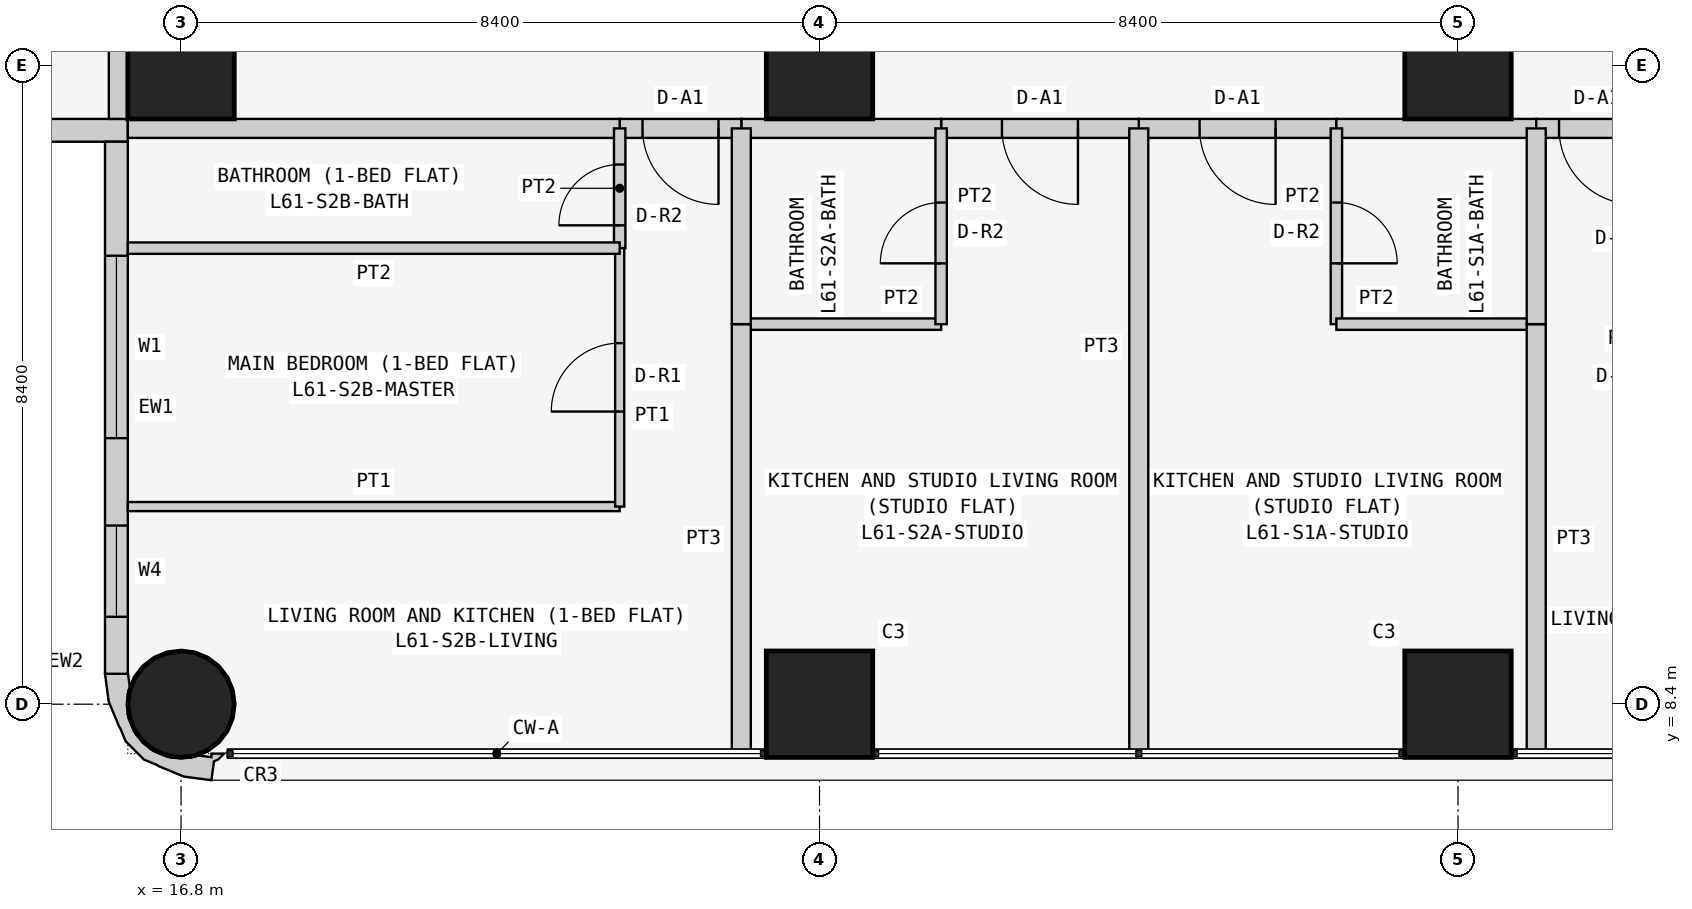
"""IFC4 building model, lengths in metres.
Left out: names, types, materials, properties, quantities, classifications, styles, units other than length and angle.
Written with IfcOpenShell. Run it as: python <this file> out.ifc"""

import sys

from ifc_helpers import new_model, si_unit, direction, frame, frame_2d, origin, origin_2d, place, context, subcontext, project, spatial, polyline, rectangle, circle, outline, extrude, element, fill, save


model = new_model("IFC4")
c1 = context("Model", 3, precision=1e-05, world=origin(), true_north=direction((0.0, 1.0)))
c2 = subcontext(c1, "Body", "Model", "MODEL_VIEW")
j1 = project(units=[si_unit("LENGTHUNIT", "METRE"), si_unit("PLANEANGLEUNIT", "RADIAN")], contexts=[c1])
p1 = place(None, origin())
s1 = spatial("IfcSite", under=j1, at=p1, CompositionType="ELEMENT")
p2 = place(p1, origin())
s2 = spatial("IfcBuilding", under=s1, at=p2, CompositionType="ELEMENT")
p3 = place(p2, frame((0.0, 0.0, 233.7)))
s3 = spatial("IfcBuildingStorey", under=s2, at=p3, CompositionType="ELEMENT", Elevation=233.7)
p4 = place(p3, frame((16.8, 8.4, 0.0), z_axis=(0.0, 0.0, 1.0), x_axis=(1.0, 0.0, 0.0)))
e1 = element("IfcColumn", 1, at=p4, inside=s3, PredefinedType="COLUMN", context=c2, shape_type="SweptSolid", body=[
    extrude(circle(Radius=0.7, at=origin_2d()), origin(), (0.0, 0.0, 1.0), 3.6),
])
for number, where, z_axis, x_axis in (
    (2, (16.8, 16.8, 0.0), (0.0, 0.0, 1.0), (1.0, 0.0, 0.0)),
    (3, (25.2, 8.4, 0.0), (0.0, 0.0, 1.0), (1.0, 0.0, 0.0)),
    (4, (25.2, 16.8, 0.0), (0.0, 0.0, 1.0), (1.0, 0.0, 0.0)),
    (5, (33.6, 8.4, 0.0), (0.0, 0.0, 1.0), (1.0, 0.0, 0.0)),
    (6, (33.6, 16.8, 0.0), (0.0, 0.0, 1.0), (1.0, 0.0, 0.0)),
):
    element("IfcColumn", number, at=place(p3, frame(where, z_axis=z_axis, x_axis=x_axis)), inside=s3, PredefinedType="COLUMN", context=c2, shape_type="SweptSolid", body=[
        extrude(rectangle(XDim=1.4, YDim=1.4, at=origin_2d()), origin(), (0.0, 0.0, 1.0), 3.6),
    ])
p5 = place(p3, frame((0.4, 15.95, 0.0), z_axis=(0.0, 0.0, 1.0), x_axis=(1.0, 0.0, 0.0)))
e7 = element("IfcWall", 7, at=p5, inside=s3, PredefinedType="SOLIDWALL", context=c2, shape_type="SweptSolid", body=[
    extrude(rectangle(XDim=15.7, YDim=0.3, at=frame_2d((7.85, 0.0))), origin(), (0.0, 0.0, 1.0), 3.45),
])
p6 = place(p5, frame((12.4, 0.0, 0.9)))
e8 = element("IfcOpeningElement", 8, at=p6, cuts=e7, PredefinedType="OPENING", context=c2, shape_type="SweptSolid", body=[
    extrude(rectangle(XDim=1.8, YDim=1.5, at=frame_2d((0.9, 0.75))), frame((0.0, 0.16, 0.0), z_axis=(0.0, -1.0, 0.0), x_axis=(1.0, 0.0, 0.0)), (0.0, 0.0, 1.0), 0.32),
])
p7 = place(p5, frame((9.55, 0.0, 1.5)))
e9 = element("IfcOpeningElement", 9, at=p7, cuts=e7, PredefinedType="OPENING", context=c2, shape_type="SweptSolid", body=[
    extrude(rectangle(XDim=0.9, YDim=0.7, at=frame_2d((0.45, 0.35))), frame((0.0, 0.16, 0.0), z_axis=(0.0, -1.0, 0.0), x_axis=(1.0, 0.0, 0.0)), (0.0, 0.0, 1.0), 0.32),
])
p8 = place(p5, frame((5.1, 0.0, 0.9)))
e10 = element("IfcOpeningElement", 10, at=p8, cuts=e7, PredefinedType="OPENING", context=c2, shape_type="SweptSolid", body=[
    extrude(rectangle(XDim=1.8, YDim=1.5, at=frame_2d((0.9, 0.75))), frame((0.0, 0.16, 0.0), z_axis=(0.0, -1.0, 0.0), x_axis=(1.0, 0.0, 0.0)), (0.0, 0.0, 1.0), 0.32),
])
p9 = place(p5, frame((2.0, 0.0, 0.0)))
e11 = element("IfcOpeningElement", 11, at=p9, cuts=e7, PredefinedType="OPENING", context=c2, shape_type="SweptSolid", body=[
    extrude(rectangle(XDim=0.9, YDim=2.4, at=frame_2d((0.45, 1.2))), frame((0.0, 0.16, 0.0), z_axis=(0.0, -1.0, 0.0), x_axis=(1.0, 0.0, 0.0)), (0.0, 0.0, 1.0), 0.32),
])
p10 = place(p5, frame((0.7, 0.0, 0.9)))
e12 = element("IfcOpeningElement", 12, at=p10, cuts=e7, PredefinedType="OPENING", context=c2, shape_type="SweptSolid", body=[
    extrude(rectangle(XDim=1.2, YDim=1.5, at=frame_2d((0.6, 0.75))), frame((0.0, 0.16, 0.0), z_axis=(0.0, -1.0, 0.0), x_axis=(1.0, 0.0, 0.0)), (0.0, 0.0, 1.0), 0.32),
])
p11 = place(p3, frame((15.95, 15.8, 0.0), z_axis=(0.0, 0.0, 1.0), x_axis=(0.0, -1.0, 0.0)))
e13 = element("IfcWall", 13, at=p11, inside=s3, PredefinedType="SOLIDWALL", context=c2, shape_type="SweptSolid", body=[
    extrude(rectangle(XDim=7.0, YDim=0.3, at=frame_2d((3.5, 0.0))), origin(), (0.0, 0.0, 1.0), 3.45),
])
p12 = place(p11, frame((1.5, 0.0, 0.9)))
e14 = element("IfcOpeningElement", 14, at=p12, cuts=e13, PredefinedType="OPENING", context=c2, shape_type="SweptSolid", body=[
    extrude(rectangle(XDim=2.4, YDim=1.5, at=frame_2d((1.2, 0.75))), frame((0.0, 0.16, 0.0), z_axis=(0.0, -1.0, 0.0), x_axis=(1.0, 0.0, 0.0)), (0.0, 0.0, 1.0), 0.32),
])
p13 = place(p11, frame((5.05, 0.0, 0.9)))
e15 = element("IfcOpeningElement", 15, at=p13, cuts=e13, PredefinedType="OPENING", context=c2, shape_type="SweptSolid", body=[
    extrude(rectangle(XDim=1.2, YDim=1.5, at=frame_2d((0.6, 0.75))), frame((0.0, 0.16, 0.0), z_axis=(0.0, -1.0, 0.0), x_axis=(1.0, 0.0, 0.0)), (0.0, 0.0, 1.0), 0.32),
])
p14 = place(p3, frame((16.076, 8.69, 0.0), z_axis=(0.0, 0.0, 1.0), x_axis=(-0.439933741929, -0.898030234854, 0.0)))
e16 = element("IfcWall", 16, at=p14, inside=s3, PredefinedType="SOLIDWALL", context=c2, shape_type="SweptSolid", body=[
    extrude(outline(polyline([(0.664, 1.577), (0.426, 1.497), (0.382, 1.536), (0.276, 1.572), (0.349, 1.423), (0.392, 1.444), (0.453, 1.261), (0.51, 1.211), (0.632, 0.961), (0.65, 0.683), (0.56, 0.419), (0.375, 0.21), (0.125, 0.087), (0.05, 0.082), (-0.127, -0.035), (-0.145, -0.044), (0.022, -0.296), (0.327, -0.094), (0.568, 0.18), (0.578, 0.199), (0.7, 0.337), (0.811, 0.661), (0.799, 0.846), (0.803, 0.866), (0.78, 1.231), (0.664, 1.577)])), origin(), (0.0, 0.0, 1.0), 3.45),
])
p15 = place(p3, frame((32.0, 15.975, 0.0), z_axis=(0.0, 0.0, 1.0), x_axis=(-1.0, 0.0, 0.0)))
e17 = element("IfcWall", 17, at=p15, inside=s3, PredefinedType="PARTITIONING", context=c2, shape_type="SweptSolid", body=[
    extrude(rectangle(XDim=2.6, YDim=0.25, at=frame_2d((1.3, 0.0))), origin(), (0.0, 0.0, 1.0), 3.45),
])
p16 = place(p15, frame((0.8, 0.0, 0.0)))
e18 = element("IfcOpeningElement", 18, at=p16, cuts=e17, PredefinedType="OPENING", context=c2, shape_type="SweptSolid", body=[
    extrude(rectangle(XDim=1.0, YDim=2.1, at=frame_2d((0.5, 1.05))), frame((0.0, 0.135, 0.0), z_axis=(0.0, -1.0, 0.0), x_axis=(1.0, 0.0, 0.0)), (0.0, 0.0, 1.0), 0.27),
])
p17 = place(p3, frame((34.629, 15.975, 0.0), z_axis=(0.0, 0.0, 1.0), x_axis=(-1.0, 0.0, 0.0)))
e19 = element("IfcWall", 19, at=p17, inside=s3, PredefinedType="PARTITIONING", context=c2, shape_type="SweptSolid", body=[
    extrude(rectangle(XDim=2.629, YDim=0.25, at=frame_2d((1.314, 0.0))), origin(), (0.0, 0.0, 1.0), 3.45),
])
p18 = place(p3, frame((36.229, 15.975, 0.0), z_axis=(0.0, 0.0, 1.0), x_axis=(-1.0, 0.0, 0.0)))
e20 = element("IfcWall", 20, at=p18, inside=s3, PredefinedType="PARTITIONING", context=c2, shape_type="SweptSolid", body=[
    extrude(rectangle(XDim=1.6, YDim=0.25, at=frame_2d((0.8, 0.0))), origin(), (0.0, 0.0, 1.0), 3.45),
])
p19 = place(p18, frame((0.3, 0.0, 0.0)))
e21 = element("IfcOpeningElement", 21, at=p19, cuts=e20, PredefinedType="OPENING", context=c2, shape_type="SweptSolid", body=[
    extrude(rectangle(XDim=1.0, YDim=2.1, at=frame_2d((0.5, 1.05))), frame((0.0, 0.135, 0.0), z_axis=(0.0, -1.0, 0.0), x_axis=(1.0, 0.0, 0.0)), (0.0, 0.0, 1.0), 0.27),
])
p20 = place(p3, frame((29.4, 15.975, 0.0), z_axis=(0.0, 0.0, 1.0), x_axis=(-1.0, 0.0, 0.0)))
e22 = element("IfcWall", 22, at=p20, inside=s3, PredefinedType="PARTITIONING", context=c2, shape_type="SweptSolid", body=[
    extrude(rectangle(XDim=2.6, YDim=0.25, at=frame_2d((1.3, 0.0))), origin(), (0.0, 0.0, 1.0), 3.45),
])
p21 = place(p20, frame((0.8, 0.0, 0.0)))
e23 = element("IfcOpeningElement", 23, at=p21, cuts=e22, PredefinedType="OPENING", context=c2, shape_type="SweptSolid", body=[
    extrude(rectangle(XDim=1.0, YDim=2.1, at=frame_2d((0.5, 1.05))), frame((0.0, 0.135, 0.0), z_axis=(0.0, -1.0, 0.0), x_axis=(1.0, 0.0, 0.0)), (0.0, 0.0, 1.0), 0.27),
])
p22 = place(p3, frame((26.8, 15.975, 0.0), z_axis=(0.0, 0.0, 1.0), x_axis=(-1.0, 0.0, 0.0)))
e24 = element("IfcWall", 24, at=p22, inside=s3, PredefinedType="PARTITIONING", context=c2, shape_type="SweptSolid", body=[
    extrude(rectangle(XDim=2.629, YDim=0.25, at=frame_2d((1.314, 0.0))), origin(), (0.0, 0.0, 1.0), 3.45),
])
p23 = place(p3, frame((24.171, 15.975, 0.0), z_axis=(0.0, 0.0, 1.0), x_axis=(-1.0, 0.0, 0.0)))
e25 = element("IfcWall", 25, at=p23, inside=s3, PredefinedType="PARTITIONING", context=c2, shape_type="SweptSolid", body=[
    extrude(rectangle(XDim=1.6, YDim=0.25, at=frame_2d((0.8, 0.0))), origin(), (0.0, 0.0, 1.0), 3.45),
])
p24 = place(p23, frame((0.3, 0.0, 0.0)))
e26 = element("IfcOpeningElement", 26, at=p24, cuts=e25, PredefinedType="OPENING", context=c2, shape_type="SweptSolid", body=[
    extrude(rectangle(XDim=1.0, YDim=2.1, at=frame_2d((0.5, 1.05))), frame((0.0, 0.135, 0.0), z_axis=(0.0, -1.0, 0.0), x_axis=(1.0, 0.0, 0.0)), (0.0, 0.0, 1.0), 0.27),
])
p25 = place(p3, frame((22.571, 15.975, 0.0), z_axis=(0.0, 0.0, 1.0), x_axis=(-1.0, 0.0, 0.0)))
e27 = element("IfcWall", 27, at=p25, inside=s3, PredefinedType="PARTITIONING", context=c2, shape_type="SweptSolid", body=[
    extrude(rectangle(XDim=6.471, YDim=0.25, at=frame_2d((3.235, 0.0))), origin(), (0.0, 0.0, 1.0), 3.45),
])
p26 = place(p3, frame((15.975, 16.1, 0.0), z_axis=(0.0, 0.0, 1.0), x_axis=(0.0, 1.0, 0.0)))
e28 = element("IfcWall", 28, at=p26, inside=s3, PredefinedType="PARTITIONING", context=c2, shape_type="SweptSolid", body=[
    extrude(rectangle(XDim=6.871, YDim=0.25, at=frame_2d((3.436, 0.0))), origin(), (0.0, 0.0, 1.0), 3.45),
])
p27 = place(p3, frame((32.0, 15.975, 0.0), z_axis=(0.0, 0.0, 1.0), x_axis=(0.0, -1.0, 0.0)))
e29 = element("IfcWall", 29, at=p27, inside=s3, PredefinedType="PARTITIONING", context=c2, shape_type="SweptSolid", body=[
    extrude(rectangle(XDim=2.575, YDim=0.15, at=frame_2d((1.288, 0.0))), origin(), (0.0, 0.0, 1.0), 3.45),
])
p28 = place(p27, frame((0.975, 0.0, 0.0)))
e30 = element("IfcOpeningElement", 30, at=p28, cuts=e29, PredefinedType="OPENING", context=c2, shape_type="SweptSolid", body=[
    extrude(rectangle(XDim=0.8, YDim=2.1, at=frame_2d((0.4, 1.05))), frame((0.0, 0.085, 0.0), z_axis=(0.0, -1.0, 0.0), x_axis=(1.0, 0.0, 0.0)), (0.0, 0.0, 1.0), 0.17),
])
p29 = place(p3, frame((32.0, 13.4, 0.0), z_axis=(0.0, 0.0, 1.0), x_axis=(1.0, 0.0, 0.0)))
e31 = element("IfcWall", 31, at=p29, inside=s3, PredefinedType="PARTITIONING", context=c2, shape_type="SweptSolid", body=[
    extrude(rectangle(XDim=2.629, YDim=0.15, at=frame_2d((1.314, 0.0))), origin(), (0.0, 0.0, 1.0), 3.45),
])
p30 = place(p3, frame((34.629, 13.4, 0.0), z_axis=(0.0, 0.0, 1.0), x_axis=(0.0, -1.0, 0.0)))
e32 = element("IfcWall", 32, at=p30, inside=s3, PredefinedType="PARTITIONING", context=c2, shape_type="SweptSolid", body=[
    extrude(rectangle(XDim=5.65, YDim=0.25, at=frame_2d((2.825, 0.0))), origin(), (0.0, 0.0, 1.0), 3.45),
])
p31 = place(p3, frame((29.4, 7.75, 0.0), z_axis=(0.0, 0.0, 1.0), x_axis=(0.0, 1.0, 0.0)))
e33 = element("IfcWall", 33, at=p31, inside=s3, PredefinedType="PARTITIONING", context=c2, shape_type="SweptSolid", body=[
    extrude(rectangle(XDim=8.225, YDim=0.25, at=frame_2d((4.113, 0.0))), origin(), (0.0, 0.0, 1.0), 2.848),
])
p32 = place(p3, frame((34.629, 13.4, 0.0), z_axis=(0.0, 0.0, 1.0), x_axis=(0.0, 1.0, 0.0)))
e34 = element("IfcWall", 34, at=p32, inside=s3, PredefinedType="PARTITIONING", context=c2, shape_type="SweptSolid", body=[
    extrude(rectangle(XDim=2.575, YDim=0.25, at=frame_2d((1.288, 0.0))), origin(), (0.0, 0.0, 1.0), 3.45),
])
p33 = place(p3, frame((24.171, 13.4, 0.0), z_axis=(0.0, 0.0, 1.0), x_axis=(1.0, 0.0, 0.0)))
e35 = element("IfcWall", 35, at=p33, inside=s3, PredefinedType="PARTITIONING", context=c2, shape_type="SweptSolid", body=[
    extrude(rectangle(XDim=2.629, YDim=0.15, at=frame_2d((1.314, 0.0))), origin(), (0.0, 0.0, 1.0), 3.45),
])
p34 = place(p3, frame((26.8, 13.4, 0.0), z_axis=(0.0, 0.0, 1.0), x_axis=(0.0, 1.0, 0.0)))
e36 = element("IfcWall", 36, at=p34, inside=s3, PredefinedType="PARTITIONING", context=c2, shape_type="SweptSolid", body=[
    extrude(rectangle(XDim=2.575, YDim=0.15, at=frame_2d((1.288, 0.0))), origin(), (0.0, 0.0, 1.0), 3.45),
])
p35 = place(p34, frame((0.8, 0.0, 0.0)))
e37 = element("IfcOpeningElement", 37, at=p35, cuts=e36, PredefinedType="OPENING", context=c2, shape_type="SweptSolid", body=[
    extrude(rectangle(XDim=0.8, YDim=2.1, at=frame_2d((0.4, 1.05))), frame((0.0, 0.085, 0.0), z_axis=(0.0, -1.0, 0.0), x_axis=(1.0, 0.0, 0.0)), (0.0, 0.0, 1.0), 0.17),
])
p36 = place(p3, frame((24.171, 7.75, 0.0), z_axis=(0.0, 0.0, 1.0), x_axis=(0.0, 1.0, 0.0)))
e38 = element("IfcWall", 38, at=p36, inside=s3, PredefinedType="PARTITIONING", context=c2, shape_type="SweptSolid", body=[
    extrude(rectangle(XDim=5.65, YDim=0.25, at=frame_2d((2.825, 0.0))), origin(), (0.0, 0.0, 1.0), 3.45),
])
p37 = place(p3, frame((24.171, 13.4, 0.0), z_axis=(0.0, 0.0, 1.0), x_axis=(0.0, 1.0, 0.0)))
e39 = element("IfcWall", 39, at=p37, inside=s3, PredefinedType="PARTITIONING", context=c2, shape_type="SweptSolid", body=[
    extrude(rectangle(XDim=2.575, YDim=0.25, at=frame_2d((1.288, 0.0))), origin(), (0.0, 0.0, 1.0), 3.45),
])
p38 = place(p3, frame((22.571, 14.4, 0.0), z_axis=(0.0, 0.0, 1.0), x_axis=(0.0, 1.0, 0.0)))
e40 = element("IfcWall", 40, at=p38, inside=s3, PredefinedType="PARTITIONING", context=c2, shape_type="SweptSolid", body=[
    extrude(rectangle(XDim=1.575, YDim=0.15, at=frame_2d((0.788, 0.0))), origin(), (0.0, 0.0, 1.0), 3.45),
])
p39 = place(p38, frame((0.3, 0.0, 0.0)))
e41 = element("IfcOpeningElement", 41, at=p39, cuts=e40, PredefinedType="OPENING", context=c2, shape_type="SweptSolid", body=[
    extrude(rectangle(XDim=0.8, YDim=2.1, at=frame_2d((0.4, 1.05))), frame((0.0, 0.085, 0.0), z_axis=(0.0, -1.0, 0.0), x_axis=(1.0, 0.0, 0.0)), (0.0, 0.0, 1.0), 0.17),
])
p40 = place(p3, frame((16.1, 11.0, 0.0), z_axis=(0.0, 0.0, 1.0), x_axis=(1.0, 0.0, 0.0)))
e42 = element("IfcWall", 42, at=p40, inside=s3, PredefinedType="PARTITIONING", context=c2, shape_type="SweptSolid", body=[
    extrude(rectangle(XDim=6.471, YDim=0.12, at=frame_2d((3.235, 0.0))), origin(), (0.0, 0.0, 1.0), 3.45),
])
p41 = place(p3, frame((22.571, 11.0, 0.0), z_axis=(0.0, 0.0, 1.0), x_axis=(0.0, 1.0, 0.0)))
e43 = element("IfcWall", 43, at=p41, inside=s3, PredefinedType="PARTITIONING", context=c2, shape_type="SweptSolid", body=[
    extrude(rectangle(XDim=3.4, YDim=0.12, at=frame_2d((1.7, 0.0))), origin(), (0.0, 0.0, 1.0), 3.45),
])
p42 = place(p41, frame((1.25, 0.0, 0.0)))
e44 = element("IfcOpeningElement", 44, at=p42, cuts=e43, PredefinedType="OPENING", context=c2, shape_type="SweptSolid", body=[
    extrude(rectangle(XDim=0.9, YDim=2.1, at=frame_2d((0.45, 1.05))), frame((0.0, 0.07, 0.0), z_axis=(0.0, -1.0, 0.0), x_axis=(1.0, 0.0, 0.0)), (0.0, 0.0, 1.0), 0.14),
])
p43 = place(p3, frame((22.571, 14.4, 0.0), z_axis=(0.0, 0.0, 1.0), x_axis=(-1.0, 0.0, 0.0)))
e45 = element("IfcWall", 45, at=p43, inside=s3, PredefinedType="PARTITIONING", context=c2, shape_type="SweptSolid", body=[
    extrude(rectangle(XDim=6.471, YDim=0.15, at=frame_2d((3.235, 0.0))), origin(), (0.0, 0.0, 1.0), 3.45),
])
p44 = place(p12, origin())
e46 = element("IfcWindow", 46, at=p44, inside=s3, PartitioningType="SINGLE_PANEL", PredefinedType="WINDOW", context=c2, shape_type="SweptSolid", body=[
    extrude(rectangle(XDim=2.4, YDim=1.5, at=frame_2d((1.2, 0.75))), frame((0.0, 0.03, 0.0), z_axis=(0.0, -1.0, 0.0), x_axis=(1.0, 0.0, 0.0)), (0.0, 0.0, 1.0), 0.06),
])
fill(e14, e46)
p45 = place(p13, origin())
e47 = element("IfcWindow", 47, at=p45, inside=s3, PartitioningType="SINGLE_PANEL", PredefinedType="WINDOW", context=c2, shape_type="SweptSolid", body=[
    extrude(rectangle(XDim=1.2, YDim=1.5, at=frame_2d((0.6, 0.75))), frame((0.0, 0.03, 0.0), z_axis=(0.0, -1.0, 0.0), x_axis=(1.0, 0.0, 0.0)), (0.0, 0.0, 1.0), 0.06),
])
fill(e15, e47)
p46 = place(p16, origin())
e48 = element("IfcDoor", 48, at=p46, inside=s3, OperationType="SINGLE_SWING_LEFT", PredefinedType="DOOR", context=c2, shape_type="SweptSolid", body=[
    extrude(rectangle(XDim=1.0, YDim=2.1, at=frame_2d((0.5, 1.05))), frame((0.0, 0.025, 0.0), z_axis=(0.0, -1.0, 0.0), x_axis=(1.0, 0.0, 0.0)), (0.0, 0.0, 1.0), 0.05),
])
fill(e18, e48)
p47 = place(p28, origin())
e49 = element("IfcDoor", 49, at=p47, inside=s3, OperationType="SINGLE_SWING_RIGHT", PredefinedType="DOOR", context=c2, shape_type="SweptSolid", body=[
    extrude(rectangle(XDim=0.8, YDim=2.1, at=frame_2d((0.4, 1.05))), frame((0.0, 0.025, 0.0), z_axis=(0.0, -1.0, 0.0), x_axis=(1.0, 0.0, 0.0)), (0.0, 0.0, 1.0), 0.05),
])
fill(e30, e49)
p48 = place(p19, origin())
e50 = element("IfcDoor", 50, at=p48, inside=s3, OperationType="SINGLE_SWING_LEFT", PredefinedType="DOOR", context=c2, shape_type="SweptSolid", body=[
    extrude(rectangle(XDim=1.0, YDim=2.1, at=frame_2d((0.5, 1.05))), frame((0.0, 0.025, 0.0), z_axis=(0.0, -1.0, 0.0), x_axis=(1.0, 0.0, 0.0)), (0.0, 0.0, 1.0), 0.05),
])
fill(e21, e50)
p49 = place(p21, origin())
e51 = element("IfcDoor", 51, at=p49, inside=s3, OperationType="SINGLE_SWING_LEFT", PredefinedType="DOOR", context=c2, shape_type="SweptSolid", body=[
    extrude(rectangle(XDim=1.0, YDim=2.1, at=frame_2d((0.5, 1.05))), frame((0.0, 0.025, 0.0), z_axis=(0.0, -1.0, 0.0), x_axis=(1.0, 0.0, 0.0)), (0.0, 0.0, 1.0), 0.05),
])
fill(e23, e51)
p50 = place(p35, origin())
e52 = element("IfcDoor", 52, at=p50, inside=s3, OperationType="SINGLE_SWING_LEFT", PredefinedType="DOOR", context=c2, shape_type="SweptSolid", body=[
    extrude(rectangle(XDim=0.8, YDim=2.1, at=frame_2d((0.4, 1.05))), frame((0.0, 0.025, 0.0), z_axis=(0.0, -1.0, 0.0), x_axis=(1.0, 0.0, 0.0)), (0.0, 0.0, 1.0), 0.05),
])
fill(e37, e52)
p51 = place(p24, origin())
e53 = element("IfcDoor", 53, at=p51, inside=s3, OperationType="SINGLE_SWING_LEFT", PredefinedType="DOOR", context=c2, shape_type="SweptSolid", body=[
    extrude(rectangle(XDim=1.0, YDim=2.1, at=frame_2d((0.5, 1.05))), frame((0.0, 0.025, 0.0), z_axis=(0.0, -1.0, 0.0), x_axis=(1.0, 0.0, 0.0)), (0.0, 0.0, 1.0), 0.05),
])
fill(e26, e53)
p52 = place(p39, origin())
e54 = element("IfcDoor", 54, at=p52, inside=s3, OperationType="SINGLE_SWING_LEFT", PredefinedType="DOOR", context=c2, shape_type="SweptSolid", body=[
    extrude(rectangle(XDim=0.8, YDim=2.1, at=frame_2d((0.4, 1.05))), frame((0.0, 0.025, 0.0), z_axis=(0.0, -1.0, 0.0), x_axis=(1.0, 0.0, 0.0)), (0.0, 0.0, 1.0), 0.05),
])
fill(e41, e54)
p53 = place(p42, origin())
e55 = element("IfcDoor", 55, at=p53, inside=s3, OperationType="SINGLE_SWING_LEFT", PredefinedType="DOOR", context=c2, shape_type="SweptSolid", body=[
    extrude(rectangle(XDim=0.9, YDim=2.1, at=frame_2d((0.45, 1.05))), frame((0.0, 0.025, 0.0), z_axis=(0.0, -1.0, 0.0), x_axis=(1.0, 0.0, 0.0)), (0.0, 0.0, 1.0), 0.05),
])
fill(e44, e55)
save(model, sys.argv[1])
